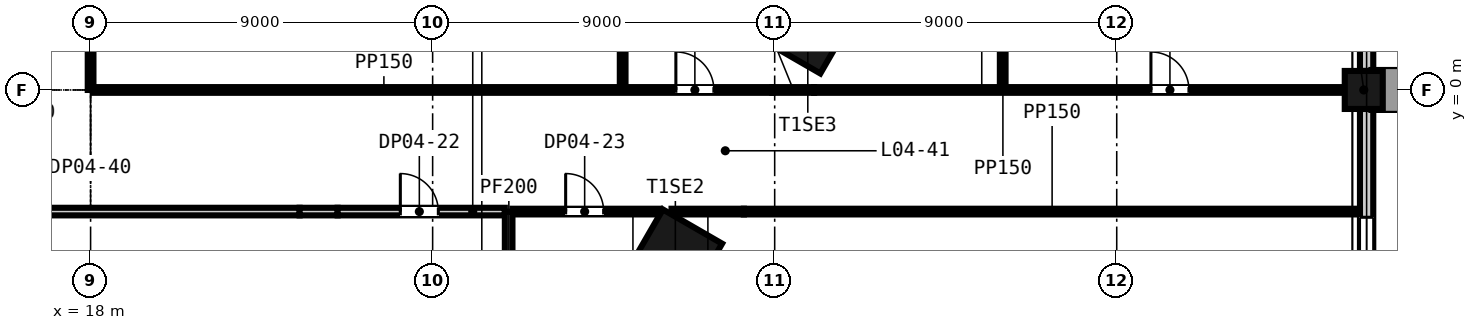
"""IFC4 building model, lengths in metres.
Left out: names, types, materials, properties, quantities, classifications, styles, units other than length and angle.
Written with IfcOpenShell. Run it as: python <this file> out.ifc"""

import sys

from ifc_helpers import new_model, si_unit, direction, frame, frame_2d, origin, origin_2d, place, context, subcontext, project, spatial, rectangle, extrude, element, fill, save


model = new_model("IFC4")
c1 = context("Model", 3, precision=1e-05, world=origin(), true_north=direction((0.0, 1.0)))
c2 = subcontext(c1, "Body", "Model", "MODEL_VIEW")
j1 = project(units=[si_unit("LENGTHUNIT", "METRE"), si_unit("PLANEANGLEUNIT", "RADIAN")], contexts=[c1])
p1 = place(None, origin())
s1 = spatial("IfcSite", under=j1, at=p1, CompositionType="ELEMENT")
p2 = place(p1, origin())
s2 = spatial("IfcBuilding", under=s1, at=p2, CompositionType="ELEMENT")
p3 = place(p2, frame((0.0, 0.0, 27.0)))
s3 = spatial("IfcBuildingStorey", under=s2, at=p3, CompositionType="ELEMENT", Elevation=27.0)
for number, where, z_axis, x_axis in (
    (1, (33.387, -4.373, -0.3), (0.0, 0.0, 1.0), (0.5, 0.866, 0.0)),
    (2, (36.872, 1.663, -0.3), (0.0, 0.0, 1.0), (0.5, 0.866, 0.0)),
):
    element("IfcColumn", number, at=place(p3, frame(where, z_axis=z_axis, x_axis=x_axis)), inside=s3, PredefinedType="COLUMN", context=c2, shape_type="SweptSolid", body=[
        extrude(rectangle(XDim=1.8, YDim=1.8, at=origin_2d()), origin(), (0.0, 0.0, 1.0), 4.5),
    ])
p4 = place(p3, frame((51.5, 0.0, -0.3), z_axis=(0.0, 0.0, 1.0), x_axis=(0.0, 1.0, 0.0)))
e3 = element("IfcColumn", 3, at=p4, inside=s3, PredefinedType="COLUMN", context=c2, shape_type="SweptSolid", body=[
    extrude(rectangle(XDim=1.0, YDim=1.0, at=origin_2d()), origin(), (0.0, 0.0, 1.0), 4.5),
])
p5 = place(p3, frame((51.575, -8.2, -0.3), z_axis=(0.0, 0.0, 1.0), x_axis=(0.0, 1.0, 0.0)))
e4 = element("IfcWall", 4, at=p5, inside=s3, PredefinedType="SOLIDWALL", context=c2, shape_type="SweptSolid", body=[
    extrude(rectangle(XDim=7.7, YDim=0.35, at=frame_2d((3.85, 0.0))), origin(), (0.0, 0.0, 1.0), 3.6),
])
p6 = place(p5, frame((2.85, 0.0, 1.2)))
e5 = element("IfcOpeningElement", 5, at=p6, cuts=e4, PredefinedType="OPENING", context=c2, shape_type="SweptSolid", body=[
    extrude(rectangle(XDim=2.0, YDim=2.35, at=frame_2d((1.0, 1.175))), frame((0.0, 0.185, 0.0), z_axis=(0.0, -1.0, 0.0), x_axis=(1.0, 0.0, 0.0)), (0.0, 0.0, 1.0), 0.37),
])
p7 = place(p3, frame((51.575, 0.5, -0.3), z_axis=(0.0, 0.0, 1.0), x_axis=(0.0, 1.0, 0.0)))
e6 = element("IfcWall", 6, at=p7, inside=s3, PredefinedType="SOLIDWALL", context=c2, shape_type="SweptSolid", body=[
    extrude(rectangle(XDim=7.75, YDim=0.35, at=frame_2d((3.875, 0.0))), origin(), (0.0, 0.0, 1.0), 3.6),
])
p8 = place(p7, frame((2.875, 0.0, 1.2)))
e7 = element("IfcOpeningElement", 7, at=p8, cuts=e6, PredefinedType="OPENING", context=c2, shape_type="SweptSolid", body=[
    extrude(rectangle(XDim=2.0, YDim=2.35, at=frame_2d((1.0, 1.175))), frame((0.0, 0.185, 0.0), z_axis=(0.0, -1.0, 0.0), x_axis=(1.0, 0.0, 0.0)), (0.0, 0.0, 1.0), 0.37),
])
p9 = place(p3, frame((9.1, -3.2, 0.0), z_axis=(0.0, 0.0, 1.0), x_axis=(1.0, 0.0, 0.0)))
e8 = element("IfcWall", 8, at=p9, inside=s3, PredefinedType="PARTITIONING", context=c2, shape_type="SweptSolid", body=[
    extrude(rectangle(XDim=14.4, YDim=0.2, at=frame_2d((7.2, 0.0))), origin(), (0.0, 0.0, 1.0), 4.2),
])
p10 = place(p3, frame((23.5, -3.2, 0.0), z_axis=(0.0, 0.0, 1.0), x_axis=(1.0, 0.0, 0.0)))
e9 = element("IfcWall", 9, at=p10, inside=s3, PredefinedType="PARTITIONING", context=c2, shape_type="SweptSolid", body=[
    extrude(rectangle(XDim=1.0, YDim=0.2, at=frame_2d((0.5, 0.0))), origin(), (0.0, 0.0, 1.0), 3.286),
])
p11 = place(p3, frame((24.5, -3.2, 0.0), z_axis=(0.0, 0.0, 1.0), x_axis=(1.0, 0.0, 0.0)))
e10 = element("IfcWall", 10, at=p11, inside=s3, PredefinedType="PARTITIONING", context=c2, shape_type="SweptSolid", body=[
    extrude(rectangle(XDim=4.4, YDim=0.2, at=frame_2d((2.2, 0.0))), origin(), (0.0, 0.0, 1.0), 4.2),
])
p12 = place(p11, frame((1.65, 0.0, 0.0)))
e11 = element("IfcOpeningElement", 11, at=p12, cuts=e10, PredefinedType="OPENING", context=c2, shape_type="SweptSolid", body=[
    extrude(rectangle(XDim=1.0, YDim=2.1, at=frame_2d((0.5, 1.05))), frame((0.0, 0.11, 0.0), z_axis=(0.0, -1.0, 0.0), x_axis=(1.0, 0.0, 0.0)), (0.0, 0.0, 1.0), 0.22),
])
p13 = place(p3, frame((29.1, -3.2, 0.0), z_axis=(0.0, 0.0, 1.0), x_axis=(1.0, 0.0, 0.0)))
e12 = element("IfcWall", 12, at=p13, inside=s3, PredefinedType="PARTITIONING", context=c2, shape_type="SweptSolid", body=[
    extrude(rectangle(XDim=3.881, YDim=0.15, at=frame_2d((1.94, 0.0))), origin(), (0.0, 0.0, 1.0), 4.2),
])
p14 = place(p13, frame((1.4, 0.0, 0.0)))
e13 = element("IfcOpeningElement", 13, at=p14, cuts=e12, PredefinedType="OPENING", context=c2, shape_type="SweptSolid", body=[
    extrude(rectangle(XDim=1.0, YDim=2.1, at=frame_2d((0.5, 1.05))), frame((0.0, 0.085, 0.0), z_axis=(0.0, -1.0, 0.0), x_axis=(1.0, 0.0, 0.0)), (0.0, 0.0, 1.0), 0.17),
])
p15 = place(p3, frame((33.286, -3.2, 0.0), z_axis=(0.0, 0.0, 1.0), x_axis=(1.0, 0.0, 0.0)))
e14 = element("IfcWall", 14, at=p15, inside=s3, PredefinedType="PARTITIONING", context=c2, shape_type="SweptSolid", body=[
    extrude(rectangle(XDim=1.904, YDim=0.15, at=frame_2d((0.952, 0.0))), origin(), (0.0, 0.0, 1.0), 3.2),
])
p16 = place(p3, frame((35.189, -3.2, 0.0), z_axis=(0.0, 0.0, 1.0), x_axis=(1.0, 0.0, 0.0)))
e15 = element("IfcWall", 15, at=p16, inside=s3, PredefinedType="PARTITIONING", context=c2, shape_type="SweptSolid", body=[
    extrude(rectangle(XDim=16.21, YDim=0.15, at=frame_2d((8.105, 0.0))), origin(), (0.0, 0.0, 1.0), 4.2),
])
p17 = place(p3, frame((18.075, 0.0, 0.0), z_axis=(0.0, 0.0, 1.0), x_axis=(1.0, 0.0, 0.0)))
e16 = element("IfcWall", 16, at=p17, inside=s3, PredefinedType="PARTITIONING", context=c2, shape_type="SweptSolid", body=[
    extrude(rectangle(XDim=17.865, YDim=0.15, at=frame_2d((8.933, 0.0))), origin(), (0.0, 0.0, 1.0), 4.2),
])
p18 = place(p17, frame((15.325, 0.0, 0.0)))
e17 = element("IfcOpeningElement", 17, at=p18, cuts=e16, PredefinedType="OPENING", context=c2, shape_type="SweptSolid", body=[
    extrude(rectangle(XDim=1.0, YDim=2.1, at=frame_2d((0.5, 1.05))), frame((0.0, 0.085, 0.0), z_axis=(0.0, -1.0, 0.0), x_axis=(1.0, 0.0, 0.0)), (0.0, 0.0, 1.0), 0.17),
])
p19 = place(p3, frame((35.94, 0.0, 0.0), z_axis=(0.0, 0.0, 1.0), x_axis=(1.0, 0.0, 0.0)))
e18 = element("IfcWall", 18, at=p19, inside=s3, PredefinedType="PARTITIONING", context=c2, shape_type="SweptSolid", body=[
    extrude(rectangle(XDim=1.097, YDim=0.15, at=frame_2d((0.548, 0.0))), origin(), (0.0, 0.0, 1.0), 3.2),
])
p20 = place(p3, frame((37.037, 0.0, 0.0), z_axis=(0.0, 0.0, 1.0), x_axis=(1.0, 0.0, 0.0)))
e19 = element("IfcWall", 19, at=p20, inside=s3, PredefinedType="PARTITIONING", context=c2, shape_type="SweptSolid", body=[
    extrude(rectangle(XDim=13.963, YDim=0.15, at=frame_2d((6.981, 0.0))), origin(), (0.0, 0.0, 1.0), 4.2),
])
p21 = place(p20, frame((8.863, 0.0, 0.0)))
e20 = element("IfcOpeningElement", 20, at=p21, cuts=e19, PredefinedType="OPENING", context=c2, shape_type="SweptSolid", body=[
    extrude(rectangle(XDim=1.0, YDim=2.1, at=frame_2d((0.5, 1.05))), frame((0.0, 0.085, 0.0), z_axis=(0.0, -1.0, 0.0), x_axis=(1.0, 0.0, 0.0)), (0.0, 0.0, 1.0), 0.17),
])
p22 = place(p3, frame((18.0, 0.0, 0.0), z_axis=(0.0, 0.0, 1.0), x_axis=(0.0, 1.0, 0.0)))
e21 = element("IfcWall", 21, at=p22, inside=s3, PredefinedType="PARTITIONING", context=c2, shape_type="SweptSolid", body=[
    extrude(rectangle(XDim=14.25, YDim=0.15, at=frame_2d((7.125, 0.0))), origin(), (0.0, 0.0, 1.0), 4.2),
])
p23 = place(p22, frame((6.65, 0.0, 0.0)))
e22 = element("IfcOpeningElement", 22, at=p23, cuts=e21, PredefinedType="OPENING", context=c2, shape_type="SweptSolid", body=[
    extrude(rectangle(XDim=1.0, YDim=2.1, at=frame_2d((0.5, 1.05))), frame((0.0, 0.085, 0.0), z_axis=(0.0, -1.0, 0.0), x_axis=(1.0, 0.0, 0.0)), (0.0, 0.0, 1.0), 0.17),
])
p24 = place(p3, frame((29.0, -11.97, 0.0), z_axis=(0.0, 0.0, 1.0), x_axis=(0.0, 1.0, 0.0)))
e23 = element("IfcWall", 23, at=p24, inside=s3, PredefinedType="PARTITIONING", context=c2, shape_type="SweptSolid", body=[
    extrude(rectangle(XDim=8.771, YDim=0.2, at=frame_2d((4.385, 0.0))), origin(), (0.0, 0.0, 1.0), 4.2),
])
p25 = place(p3, frame((32.0, 0.075, 0.0), z_axis=(0.0, 0.0, 1.0), x_axis=(0.0, 1.0, 0.0)))
e24 = element("IfcWall", 24, at=p25, inside=s3, PredefinedType="PARTITIONING", context=c2, shape_type="SweptSolid", body=[
    extrude(rectangle(XDim=9.669, YDim=0.15, at=frame_2d((4.834, 0.0))), origin(), (0.0, 0.0, 1.0), 4.2),
])
p26 = place(p3, frame((42.0, 0.075, 0.0), z_axis=(0.0, 0.0, 1.0), x_axis=(0.0, 1.0, 0.0)))
e25 = element("IfcWall", 25, at=p26, inside=s3, PredefinedType="PARTITIONING", context=c2, shape_type="SweptSolid", body=[
    extrude(rectangle(XDim=14.1, YDim=0.15, at=frame_2d((7.05, 0.0))), origin(), (0.0, 0.0, 1.0), 4.2),
])
p27 = place(p6, origin())
e26 = element("IfcWindow", 26, at=p27, inside=s3, PartitioningType="SINGLE_PANEL", PredefinedType="WINDOW", context=c2, shape_type="SweptSolid", body=[
    extrude(rectangle(XDim=2.0, YDim=2.35, at=frame_2d((1.0, 1.175))), frame((0.0, 0.03, 0.0), z_axis=(0.0, -1.0, 0.0), x_axis=(1.0, 0.0, 0.0)), (0.0, 0.0, 1.0), 0.06),
])
fill(e5, e26)
p28 = place(p12, origin())
e27 = element("IfcDoor", 27, at=p28, inside=s3, OperationType="SINGLE_SWING_LEFT", PredefinedType="DOOR", context=c2, shape_type="SweptSolid", body=[
    extrude(rectangle(XDim=1.0, YDim=2.1, at=frame_2d((0.5, 1.05))), frame((0.0, 0.025, 0.0), z_axis=(0.0, -1.0, 0.0), x_axis=(1.0, 0.0, 0.0)), (0.0, 0.0, 1.0), 0.05),
])
fill(e11, e27)
p29 = place(p14, origin())
e28 = element("IfcDoor", 28, at=p29, inside=s3, OperationType="SINGLE_SWING_LEFT", PredefinedType="DOOR", context=c2, shape_type="SweptSolid", body=[
    extrude(rectangle(XDim=1.0, YDim=2.1, at=frame_2d((0.5, 1.05))), frame((0.0, 0.025, 0.0), z_axis=(0.0, -1.0, 0.0), x_axis=(1.0, 0.0, 0.0)), (0.0, 0.0, 1.0), 0.05),
])
fill(e13, e28)
p30 = place(p18, origin())
e29 = element("IfcDoor", 29, at=p30, inside=s3, OperationType="SINGLE_SWING_LEFT", PredefinedType="DOOR", context=c2, shape_type="SweptSolid", body=[
    extrude(rectangle(XDim=1.0, YDim=2.1, at=frame_2d((0.5, 1.05))), frame((0.0, 0.025, 0.0), z_axis=(0.0, -1.0, 0.0), x_axis=(1.0, 0.0, 0.0)), (0.0, 0.0, 1.0), 0.05),
])
fill(e17, e29)
p31 = place(p21, origin())
e30 = element("IfcDoor", 30, at=p31, inside=s3, OperationType="SINGLE_SWING_LEFT", PredefinedType="DOOR", context=c2, shape_type="SweptSolid", body=[
    extrude(rectangle(XDim=1.0, YDim=2.1, at=frame_2d((0.5, 1.05))), frame((0.0, 0.025, 0.0), z_axis=(0.0, -1.0, 0.0), x_axis=(1.0, 0.0, 0.0)), (0.0, 0.0, 1.0), 0.05),
])
fill(e20, e30)
save(model, sys.argv[1])
